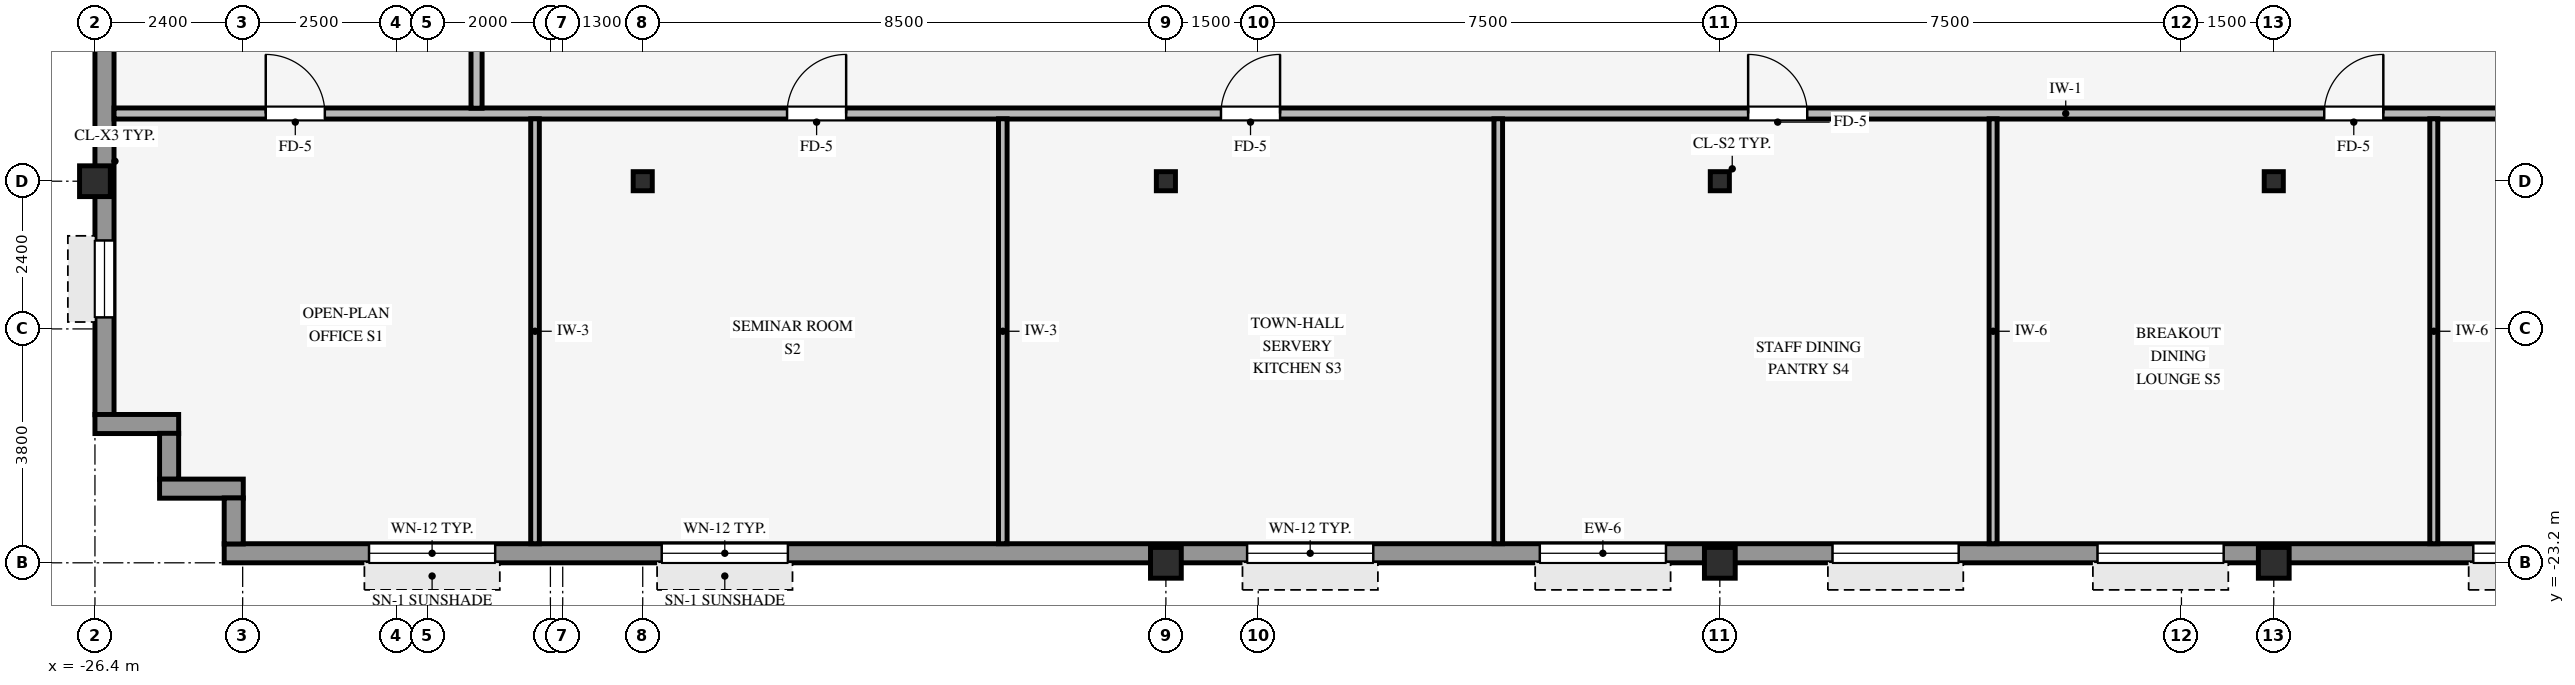
"""IFC4 building model, lengths in metres.
Left out: names, types, materials, properties, quantities, classifications, styles, units other than length and angle.
Written with IfcOpenShell. Run it as: python <this file> out.ifc"""

import sys

from ifc_helpers import new_model, si_unit, direction, frame, frame_2d, origin, origin_2d, place, context, subcontext, project, spatial, rectangle, hollow_rectangle, i_section, extrude, source, transform, mapped, element, fill, save


model = new_model("IFC4")
c1 = context("Model", 3, precision=1e-05, world=origin(), true_north=direction((0.0, 1.0)))
c2 = subcontext(c1, "Body", "Model", "MODEL_VIEW")
j1 = project(units=[si_unit("LENGTHUNIT", "METRE"), si_unit("PLANEANGLEUNIT", "RADIAN")], contexts=[c1])
p1 = place(None, origin())
s1 = spatial("IfcSite", under=j1, at=p1, CompositionType="ELEMENT")
p2 = place(p1, origin())
s2 = spatial("IfcBuilding", under=s1, at=p2, CompositionType="ELEMENT")
p3 = place(p2, frame((0.0, 0.0, 190.9)))
s3 = spatial("IfcBuildingStorey", under=s2, at=p3, CompositionType="ELEMENT", Elevation=190.9)
for number, where, z_axis, x_axis in (
    (1, (-26.4, -17.0, 0.0), (0.0, 0.0, 1.0), (1.0, 0.0, 0.0)),
    (2, (-9.0, -23.2, 0.0), (0.0, 0.0, 1.0), (1.0, 0.0, 0.0)),
    (3, (0.0, -23.2, 0.0), (0.0, 0.0, 1.0), (1.0, 0.0, 0.0)),
    (4, (9.0, -23.2, 0.0), (0.0, 0.0, 1.0), (1.0, 0.0, 0.0)),
):
    element("IfcColumn", number, at=place(p3, frame(where, z_axis=z_axis, x_axis=x_axis)), inside=s3, PredefinedType="COLUMN", context=c2, shape_type="SweptSolid", body=[
        extrude(hollow_rectangle(XDim=0.5, YDim=0.5, WallThickness=0.032, InnerFilletRadius=0.032, OuterFilletRadius=0.064, at=origin_2d()), origin(), (0.0, 0.0, 1.0), 3.37),
    ])
for number, where, z_axis, x_axis in (
    (5, (0.0, -17.0, 0.0), (0.0, 0.0, 1.0), (1.0, 0.0, 0.0)),
    (6, (-17.5, -17.0, 0.0), (0.0, 0.0, 1.0), (1.0, 0.0, 0.0)),
    (7, (-9.0, -17.0, 0.0), (0.0, 0.0, 1.0), (1.0, 0.0, 0.0)),
    (8, (9.0, -17.0, 0.0), (0.0, 0.0, 1.0), (1.0, 0.0, 0.0)),
):
    element("IfcColumn", number, at=place(p3, frame(where, z_axis=z_axis, x_axis=x_axis)), inside=s3, PredefinedType="COLUMN", context=c2, shape_type="SweptSolid", body=[
        extrude(i_section(OverallWidth=0.31, OverallDepth=0.31, WebThickness=0.015, FlangeThickness=0.015, FilletRadius=0.015, at=origin_2d()), origin(), (0.0, 0.0, 1.0), 3.37),
    ])
p4 = place(p3, frame((-24.3, -23.045, 0.0), z_axis=(0.0, 0.0, 1.0), x_axis=(1.0, 0.0, 0.0)))
e9 = element("IfcWall", 9, at=p4, inside=s3, PredefinedType="STANDARD", context=c2, shape_type="SweptSolid", body=[
    extrude(rectangle(XDim=44.8, YDim=0.31, at=frame_2d((22.4, 0.0))), origin(), (0.0, 0.0, 1.0), 2.705),
])
p5 = place(p4, frame((2.353, 0.0, 0.8)))
e10 = element("IfcOpeningElement", 10, at=p5, cuts=e9, PredefinedType="OPENING", context=c2, shape_type="SweptSolid", body=[
    extrude(rectangle(XDim=2.05, YDim=1.52, at=frame_2d((1.025, 0.76))), frame((0.0, 0.165, 0.0), z_axis=(0.0, -1.0, 0.0), x_axis=(1.0, 0.0, 0.0)), (0.0, 0.0, 1.0), 0.33),
])
p6 = place(p4, frame((7.108, 0.0, 0.8)))
e11 = element("IfcOpeningElement", 11, at=p6, cuts=e9, PredefinedType="OPENING", context=c2, shape_type="SweptSolid", body=[
    extrude(rectangle(XDim=2.05, YDim=1.52, at=frame_2d((1.025, 0.76))), frame((0.0, 0.165, 0.0), z_axis=(0.0, -1.0, 0.0), x_axis=(1.0, 0.0, 0.0)), (0.0, 0.0, 1.0), 0.33),
])
p7 = place(p4, frame((16.619, 0.0, 0.8)))
e12 = element("IfcOpeningElement", 12, at=p7, cuts=e9, PredefinedType="OPENING", context=c2, shape_type="SweptSolid", body=[
    extrude(rectangle(XDim=2.05, YDim=1.52, at=frame_2d((1.025, 0.76))), frame((0.0, 0.165, 0.0), z_axis=(0.0, -1.0, 0.0), x_axis=(1.0, 0.0, 0.0)), (0.0, 0.0, 1.0), 0.33),
])
p8 = place(p4, frame((21.375, 0.0, 0.8)))
e13 = element("IfcOpeningElement", 13, at=p8, cuts=e9, PredefinedType="OPENING", context=c2, shape_type="SweptSolid", body=[
    extrude(rectangle(XDim=2.05, YDim=1.52, at=frame_2d((1.025, 0.76))), frame((0.0, 0.165, 0.0), z_axis=(0.0, -1.0, 0.0), x_axis=(1.0, 0.0, 0.0)), (0.0, 0.0, 1.0), 0.33),
])
p9 = place(p4, frame((26.131, 0.0, 0.8)))
e14 = element("IfcOpeningElement", 14, at=p9, cuts=e9, PredefinedType="OPENING", context=c2, shape_type="SweptSolid", body=[
    extrude(rectangle(XDim=2.05, YDim=1.52, at=frame_2d((1.025, 0.76))), frame((0.0, 0.165, 0.0), z_axis=(0.0, -1.0, 0.0), x_axis=(1.0, 0.0, 0.0)), (0.0, 0.0, 1.0), 0.33),
])
p10 = place(p4, frame((30.436, 0.0, 0.8)))
e15 = element("IfcOpeningElement", 15, at=p10, cuts=e9, PredefinedType="OPENING", context=c2, shape_type="SweptSolid", body=[
    extrude(rectangle(XDim=2.05, YDim=1.52, at=frame_2d((1.025, 0.76))), frame((0.0, 0.165, 0.0), z_axis=(0.0, -1.0, 0.0), x_axis=(1.0, 0.0, 0.0)), (0.0, 0.0, 1.0), 0.33),
])
p11 = place(p4, frame((36.542, 0.0, 0.8)))
e16 = element("IfcOpeningElement", 16, at=p11, cuts=e9, PredefinedType="OPENING", context=c2, shape_type="SweptSolid", body=[
    extrude(rectangle(XDim=2.05, YDim=1.52, at=frame_2d((1.025, 0.76))), frame((0.0, 0.165, 0.0), z_axis=(0.0, -1.0, 0.0), x_axis=(1.0, 0.0, 0.0)), (0.0, 0.0, 1.0), 0.33),
])
p12 = place(p4, frame((40.397, 0.0, 0.8)))
e17 = element("IfcOpeningElement", 17, at=p12, cuts=e9, PredefinedType="OPENING", context=c2, shape_type="SweptSolid", body=[
    extrude(rectangle(XDim=2.05, YDim=1.52, at=frame_2d((1.025, 0.76))), frame((0.0, 0.165, 0.0), z_axis=(0.0, -1.0, 0.0), x_axis=(1.0, 0.0, 0.0)), (0.0, 0.0, 1.0), 0.33),
])
p13 = place(p3, frame((-26.245, -20.794, 0.0), z_axis=(0.0, 0.0, 1.0), x_axis=(0.0, 1.0, 0.0)))
e18 = element("IfcWall", 18, at=p13, inside=s3, PredefinedType="STANDARD", context=c2, shape_type="SweptSolid", body=[
    extrude(rectangle(XDim=37.788, YDim=0.31, at=frame_2d((18.894, 0.0))), origin(), (0.0, 0.0, 1.0), 2.705),
])
p14 = place(p13, frame((24.744, 0.0, 0.0)))
e19 = element("IfcOpeningElement", 19, at=p14, cuts=e18, PredefinedType="OPENING", context=c2, shape_type="SweptSolid", body=[
    extrude(rectangle(XDim=1.05, YDim=2.1, at=frame_2d((0.525, 1.05))), frame((0.0, 0.165, 0.0), z_axis=(0.0, -1.0, 0.0), x_axis=(1.0, 0.0, 0.0)), (0.0, 0.0, 1.0), 0.33),
])
p15 = place(p13, frame((1.581, 0.0, 0.8)))
e20 = element("IfcOpeningElement", 20, at=p15, cuts=e18, PredefinedType="OPENING", context=c2, shape_type="SweptSolid", body=[
    extrude(rectangle(XDim=1.25, YDim=1.52, at=frame_2d((0.625, 0.76))), frame((0.0, 0.165, 0.0), z_axis=(0.0, -1.0, 0.0), x_axis=(1.0, 0.0, 0.0)), (0.0, 0.0, 1.0), 0.33),
])
p16 = place(p13, frame((8.044, 0.0, 0.8)))
e21 = element("IfcOpeningElement", 21, at=p16, cuts=e18, PredefinedType="OPENING", context=c2, shape_type="SweptSolid", body=[
    extrude(rectangle(XDim=1.25, YDim=1.52, at=frame_2d((0.625, 0.76))), frame((0.0, 0.165, 0.0), z_axis=(0.0, -1.0, 0.0), x_axis=(1.0, 0.0, 0.0)), (0.0, 0.0, 1.0), 0.33),
])
p17 = place(p13, frame((13.156, 0.0, 0.8)))
e22 = element("IfcOpeningElement", 22, at=p17, cuts=e18, PredefinedType="OPENING", context=c2, shape_type="SweptSolid", body=[
    extrude(rectangle(XDim=1.25, YDim=1.52, at=frame_2d((0.625, 0.76))), frame((0.0, 0.165, 0.0), z_axis=(0.0, -1.0, 0.0), x_axis=(1.0, 0.0, 0.0)), (0.0, 0.0, 1.0), 0.33),
])
p18 = place(p13, frame((18.269, 0.0, 0.8)))
e23 = element("IfcOpeningElement", 23, at=p18, cuts=e18, PredefinedType="OPENING", context=c2, shape_type="SweptSolid", body=[
    extrude(rectangle(XDim=1.25, YDim=1.52, at=frame_2d((0.625, 0.76))), frame((0.0, 0.165, 0.0), z_axis=(0.0, -1.0, 0.0), x_axis=(1.0, 0.0, 0.0)), (0.0, 0.0, 1.0), 0.33),
])
p19 = place(p13, frame((22.932, 0.0, 0.8)))
e24 = element("IfcOpeningElement", 24, at=p19, cuts=e18, PredefinedType="OPENING", context=c2, shape_type="SweptSolid", body=[
    extrude(rectangle(XDim=1.25, YDim=1.52, at=frame_2d((0.625, 0.76))), frame((0.0, 0.165, 0.0), z_axis=(0.0, -1.0, 0.0), x_axis=(1.0, 0.0, 0.0)), (0.0, 0.0, 1.0), 0.33),
])
p20 = place(p13, frame((28.044, 0.0, 0.8)))
e25 = element("IfcOpeningElement", 25, at=p20, cuts=e18, PredefinedType="OPENING", context=c2, shape_type="SweptSolid", body=[
    extrude(rectangle(XDim=1.25, YDim=1.52, at=frame_2d((0.625, 0.76))), frame((0.0, 0.165, 0.0), z_axis=(0.0, -1.0, 0.0), x_axis=(1.0, 0.0, 0.0)), (0.0, 0.0, 1.0), 0.33),
])
p21 = place(p13, frame((33.607, 0.0, 0.8)))
e26 = element("IfcOpeningElement", 26, at=p21, cuts=e18, PredefinedType="OPENING", context=c2, shape_type="SweptSolid", body=[
    extrude(rectangle(XDim=1.25, YDim=1.52, at=frame_2d((0.625, 0.76))), frame((0.0, 0.165, 0.0), z_axis=(0.0, -1.0, 0.0), x_axis=(1.0, 0.0, 0.0)), (0.0, 0.0, 1.0), 0.33),
])
p22 = place(p3, frame((-26.4, -20.945, 0.0), z_axis=(0.0, 0.0, 1.0), x_axis=(1.0, 0.0, 0.0)))
e27 = element("IfcWall", 27, at=p22, inside=s3, PredefinedType="STANDARD", context=c2, shape_type="SweptSolid", body=[
    extrude(rectangle(XDim=1.36, YDim=0.31, at=frame_2d((0.68, 0.0))), origin(), (0.0, 0.0, 1.0), 3.36),
])
p23 = place(p3, frame((-25.195, -21.844, 0.0), z_axis=(0.0, 0.0, 1.0), x_axis=(0.0, 1.0, 0.0)))
e28 = element("IfcWall", 28, at=p23, inside=s3, PredefinedType="STANDARD", context=c2, shape_type="SweptSolid", body=[
    extrude(rectangle(XDim=0.748, YDim=0.31, at=frame_2d((0.374, 0.0))), origin(), (0.0, 0.0, 1.0), 3.36),
])
p24 = place(p3, frame((-25.35, -21.995, 0.0), z_axis=(0.0, 0.0, 1.0), x_axis=(1.0, 0.0, 0.0)))
e29 = element("IfcWall", 29, at=p24, inside=s3, PredefinedType="STANDARD", context=c2, shape_type="SweptSolid", body=[
    extrude(rectangle(XDim=1.36, YDim=0.31, at=frame_2d((0.68, 0.0))), origin(), (0.0, 0.0, 1.0), 3.36),
])
p25 = place(p3, frame((-24.145, -22.894, 0.0), z_axis=(0.0, 0.0, 1.0), x_axis=(0.0, 1.0, 0.0)))
e30 = element("IfcWall", 30, at=p25, inside=s3, PredefinedType="STANDARD", context=c2, shape_type="SweptSolid", body=[
    extrude(rectangle(XDim=0.748, YDim=0.31, at=frame_2d((0.374, 0.0))), origin(), (0.0, 0.0, 1.0), 3.36),
])
p26 = place(p3, frame((-26.09, -15.9, 0.0), z_axis=(0.0, 0.0, 1.0), x_axis=(1.0, 0.0, 0.0)))
e31 = element("IfcWall", 31, at=p26, inside=s3, PredefinedType="PARTITIONING", context=c2, shape_type="SweptSolid", body=[
    extrude(rectangle(XDim=48.38, YDim=0.18, at=frame_2d((24.19, 0.0))), origin(), (0.0, 0.0, 1.0), 3.36),
])
p27 = place(p26, frame((41.81, 0.0, 0.0)))
e32 = element("IfcOpeningElement", 32, at=p27, cuts=e31, PredefinedType="OPENING", context=c2, shape_type="SweptSolid", body=[
    extrude(rectangle(XDim=0.96, YDim=2.1, at=frame_2d((0.48, 1.05))), frame((0.0, 0.1, 0.0), z_axis=(0.0, -1.0, 0.0), x_axis=(1.0, 0.0, 0.0)), (0.0, 0.0, 1.0), 0.2),
])
p28 = place(p26, frame((17.985, 0.0, 0.0)))
e33 = element("IfcOpeningElement", 33, at=p28, cuts=e31, PredefinedType="OPENING", context=c2, shape_type="SweptSolid", body=[
    extrude(rectangle(XDim=0.96, YDim=2.1, at=frame_2d((0.48, 1.05))), frame((0.0, 0.1, 0.0), z_axis=(0.0, -1.0, 0.0), x_axis=(1.0, 0.0, 0.0)), (0.0, 0.0, 1.0), 0.2),
])
p29 = place(p26, frame((26.55, 0.0, 0.0)))
e34 = element("IfcOpeningElement", 34, at=p29, cuts=e31, PredefinedType="OPENING", context=c2, shape_type="SweptSolid", body=[
    extrude(rectangle(XDim=0.96, YDim=2.1, at=frame_2d((0.48, 1.05))), frame((0.0, 0.1, 0.0), z_axis=(0.0, -1.0, 0.0), x_axis=(1.0, 0.0, 0.0)), (0.0, 0.0, 1.0), 0.2),
])
p30 = place(p26, frame((10.935, 0.0, 0.0)))
e35 = element("IfcOpeningElement", 35, at=p30, cuts=e31, PredefinedType="OPENING", context=c2, shape_type="SweptSolid", body=[
    extrude(rectangle(XDim=0.96, YDim=2.1, at=frame_2d((0.48, 1.05))), frame((0.0, 0.1, 0.0), z_axis=(0.0, -1.0, 0.0), x_axis=(1.0, 0.0, 0.0)), (0.0, 0.0, 1.0), 0.2),
])
p31 = place(p26, frame((35.91, 0.0, 0.0)))
e36 = element("IfcOpeningElement", 36, at=p31, cuts=e31, PredefinedType="OPENING", context=c2, shape_type="SweptSolid", body=[
    extrude(rectangle(XDim=0.96, YDim=2.1, at=frame_2d((0.48, 1.05))), frame((0.0, 0.1, 0.0), z_axis=(0.0, -1.0, 0.0), x_axis=(1.0, 0.0, 0.0)), (0.0, 0.0, 1.0), 0.2),
])
p32 = place(p26, frame((2.465, 0.0, 0.0)))
e37 = element("IfcOpeningElement", 37, at=p32, cuts=e31, PredefinedType="OPENING", context=c2, shape_type="SweptSolid", body=[
    extrude(rectangle(XDim=0.96, YDim=2.1, at=frame_2d((0.48, 1.05))), frame((0.0, 0.1, 0.0), z_axis=(0.0, -1.0, 0.0), x_axis=(1.0, 0.0, 0.0)), (0.0, 0.0, 1.0), 0.2),
])
p33 = place(p3, frame((-20.2, -15.814, 0.0), z_axis=(0.0, 0.0, 1.0), x_axis=(0.0, 1.0, 0.0)))
e38 = element("IfcWall", 38, at=p33, inside=s3, PredefinedType="PARTITIONING", context=c2, shape_type="SweptSolid", body=[
    extrude(rectangle(XDim=31.628, YDim=0.18, at=frame_2d((15.814, 0.0))), origin(), (0.0, 0.0, 1.0), 3.36),
])
p34 = place(p33, frame((15.334, 0.0, 0.0)))
e39 = element("IfcOpeningElement", 39, at=p34, cuts=e38, PredefinedType="OPENING", context=c2, shape_type="SweptSolid", body=[
    extrude(rectangle(XDim=0.96, YDim=2.1, at=frame_2d((0.48, 1.05))), frame((0.0, 0.1, 0.0), z_axis=(0.0, -1.0, 0.0), x_axis=(1.0, 0.0, 0.0)), (0.0, 0.0, 1.0), 0.2),
])
p35 = place(p33, frame((5.834, 0.0, 0.0)))
e40 = element("IfcOpeningElement", 40, at=p35, cuts=e38, PredefinedType="OPENING", context=c2, shape_type="SweptSolid", body=[
    extrude(rectangle(XDim=0.96, YDim=2.1, at=frame_2d((0.48, 1.05))), frame((0.0, 0.1, 0.0), z_axis=(0.0, -1.0, 0.0), x_axis=(1.0, 0.0, 0.0)), (0.0, 0.0, 1.0), 0.2),
])
p36 = place(p33, frame((24.834, 0.0, 0.0)))
e41 = element("IfcOpeningElement", 41, at=p36, cuts=e38, PredefinedType="OPENING", context=c2, shape_type="SweptSolid", body=[
    extrude(rectangle(XDim=0.96, YDim=2.1, at=frame_2d((0.48, 1.05))), frame((0.0, 0.1, 0.0), z_axis=(0.0, -1.0, 0.0), x_axis=(1.0, 0.0, 0.0)), (0.0, 0.0, 1.0), 0.2),
])
for number, where, z_axis, x_axis in (
    (42, (-19.25, -22.89, 0.0), (0.0, 0.0, 1.0), (0.0, 1.0, 0.0)),
    (43, (-11.65, -22.89, 0.0), (0.0, 0.0, 1.0), (0.0, 1.0, 0.0)),
    (44, (-3.6, -22.89, 0.0), (0.0, 0.0, 1.0), (0.0, 1.0, 0.0)),
):
    element("IfcWall", number, at=place(p3, frame(where, z_axis=z_axis, x_axis=x_axis)), inside=s3, PredefinedType="PARTITIONING", context=c2, shape_type="SweptSolid", body=[
        extrude(rectangle(XDim=6.904, YDim=0.14, at=frame_2d((3.452, 0.0))), origin(), (0.0, 0.0, 1.0), 3.36),
    ])
for number, where, z_axis, x_axis in (
    (45, (4.44, -22.89, 0.0), (0.0, 0.0, 1.0), (0.0, 1.0, 0.0)),
    (46, (11.6, -22.89, 0.0), (0.0, 0.0, 1.0), (0.0, 1.0, 0.0)),
):
    element("IfcWall", number, at=place(p3, frame(where, z_axis=z_axis, x_axis=x_axis)), inside=s3, PredefinedType="PARTITIONING", context=c2, shape_type="SweptSolid", body=[
        extrude(rectangle(XDim=6.904, YDim=0.13, at=frame_2d((3.452, 0.0))), origin(), (0.0, 0.0, 1.0), 3.36),
    ])
m1 = source(origin(), c2, "Body", "SweptSolid", [
    extrude(rectangle(XDim=2.05, YDim=1.52, at=frame_2d((1.025, 0.76))), frame((0.0, 0.03, 0.0), z_axis=(0.0, -1.0, 0.0), x_axis=(1.0, 0.0, 0.0)), (0.0, 0.0, 1.0), 0.06),
])
p37 = place(p5, origin())
e47 = element("IfcWindow", 47, at=p37, inside=s3, PartitioningType="SINGLE_PANEL", PredefinedType="WINDOW", context=c2, shape_type="MappedRepresentation", body=[
    mapped(m1, transform((0.0, 0.0, 0.0), scale=1.0)),
])
fill(e10, e47)
p38 = place(p6, origin())
e48 = element("IfcWindow", 48, at=p38, inside=s3, PartitioningType="SINGLE_PANEL", PredefinedType="WINDOW", context=c2, shape_type="MappedRepresentation", body=[
    mapped(m1, transform((0.0, 0.0, 0.0), scale=1.0)),
])
fill(e11, e48)
p39 = place(p7, origin())
e49 = element("IfcWindow", 49, at=p39, inside=s3, PartitioningType="SINGLE_PANEL", PredefinedType="WINDOW", context=c2, shape_type="MappedRepresentation", body=[
    mapped(m1, transform((0.0, 0.0, 0.0), scale=1.0)),
])
fill(e12, e49)
p40 = place(p8, origin())
e50 = element("IfcWindow", 50, at=p40, inside=s3, PartitioningType="SINGLE_PANEL", PredefinedType="WINDOW", context=c2, shape_type="MappedRepresentation", body=[
    mapped(m1, transform((0.0, 0.0, 0.0), scale=1.0)),
])
fill(e13, e50)
p41 = place(p9, origin())
e51 = element("IfcWindow", 51, at=p41, inside=s3, PartitioningType="SINGLE_PANEL", PredefinedType="WINDOW", context=c2, shape_type="MappedRepresentation", body=[
    mapped(m1, transform((0.0, 0.0, 0.0), scale=1.0)),
])
fill(e14, e51)
p42 = place(p10, origin())
e52 = element("IfcWindow", 52, at=p42, inside=s3, PartitioningType="SINGLE_PANEL", PredefinedType="WINDOW", context=c2, shape_type="MappedRepresentation", body=[
    mapped(m1, transform((0.0, 0.0, 0.0), scale=1.0)),
])
fill(e15, e52)
p43 = place(p11, origin())
e53 = element("IfcWindow", 53, at=p43, inside=s3, PartitioningType="SINGLE_PANEL", PredefinedType="WINDOW", context=c2, shape_type="MappedRepresentation", body=[
    mapped(m1, transform((0.0, 0.0, 0.0), scale=1.0)),
])
fill(e16, e53)
m2 = source(origin(), c2, "Body", "SweptSolid", [
    extrude(rectangle(XDim=1.25, YDim=1.52, at=frame_2d((0.625, 0.76))), frame((0.0, 0.03, 0.0), z_axis=(0.0, -1.0, 0.0), x_axis=(1.0, 0.0, 0.0)), (0.0, 0.0, 1.0), 0.06),
])
p44 = place(p15, origin())
e54 = element("IfcWindow", 54, at=p44, inside=s3, PartitioningType="SINGLE_PANEL", PredefinedType="WINDOW", context=c2, shape_type="MappedRepresentation", body=[
    mapped(m2, transform((0.0, 0.0, 0.0), scale=1.0)),
])
fill(e20, e54)
m3 = source(origin(), c2, "Body", "SweptSolid", [
    extrude(rectangle(XDim=0.96, YDim=2.1, at=frame_2d((0.48, 1.05))), frame((0.0, 0.025, 0.0), z_axis=(0.0, -1.0, 0.0), x_axis=(1.0, 0.0, 0.0)), (0.0, 0.0, 1.0), 0.05),
])
p45 = place(p28, origin())
e55 = element("IfcDoor", 55, at=p45, inside=s3, OperationType="SINGLE_SWING_RIGHT", PredefinedType="DOOR", context=c2, shape_type="MappedRepresentation", body=[
    mapped(m3, transform((0.0, 0.0, 0.0), scale=1.0)),
])
fill(e33, e55)
p46 = place(p29, origin())
e56 = element("IfcDoor", 56, at=p46, inside=s3, OperationType="SINGLE_SWING_LEFT", PredefinedType="DOOR", context=c2, shape_type="MappedRepresentation", body=[
    mapped(m3, transform((0.0, 0.0, 0.0), scale=1.0)),
])
fill(e34, e56)
p47 = place(p30, origin())
e57 = element("IfcDoor", 57, at=p47, inside=s3, OperationType="SINGLE_SWING_RIGHT", PredefinedType="DOOR", context=c2, shape_type="MappedRepresentation", body=[
    mapped(m3, transform((0.0, 0.0, 0.0), scale=1.0)),
])
fill(e35, e57)
p48 = place(p31, origin())
e58 = element("IfcDoor", 58, at=p48, inside=s3, OperationType="SINGLE_SWING_RIGHT", PredefinedType="DOOR", context=c2, shape_type="MappedRepresentation", body=[
    mapped(m3, transform((0.0, 0.0, 0.0), scale=1.0)),
])
fill(e36, e58)
p49 = place(p32, origin())
e59 = element("IfcDoor", 59, at=p49, inside=s3, OperationType="SINGLE_SWING_LEFT", PredefinedType="DOOR", context=c2, shape_type="MappedRepresentation", body=[
    mapped(m3, transform((0.0, 0.0, 0.0), scale=1.0)),
])
fill(e37, e59)
save(model, sys.argv[1])
